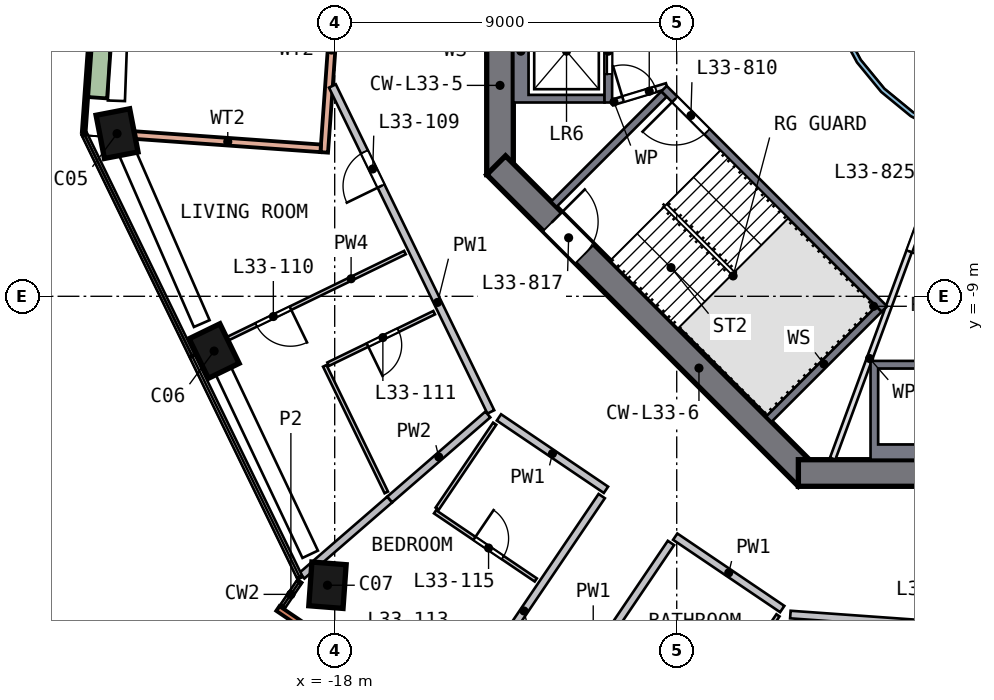
"""IFC4 building model, lengths in metres.
Left out: names, types, materials, properties, quantities, classifications, styles, units other than length and angle.
Written with IfcOpenShell. Run it as: python <this file> out.ifc"""

import sys

from ifc_helpers import new_model, si_unit, direction, frame, frame_2d, origin, origin_2d, place, context, subcontext, project, spatial, polyline, rectangle, outline, extrude, element, fill, save


model = new_model("IFC4")
c1 = context("Model", 3, precision=1e-05, world=origin(), true_north=direction((0.0, 1.0)))
c2 = subcontext(c1, "Body", "Model", "MODEL_VIEW")
j1 = project(units=[si_unit("LENGTHUNIT", "METRE"), si_unit("PLANEANGLEUNIT", "RADIAN")], contexts=[c1])
p1 = place(None, origin())
s1 = spatial("IfcSite", under=j1, at=p1, CompositionType="ELEMENT")
p2 = place(p1, origin())
s2 = spatial("IfcBuilding", under=s1, at=p2, CompositionType="ELEMENT")
p3 = place(p2, frame((0.0, 0.0, 140.0)))
s3 = spatial("IfcBuildingStorey", under=s2, at=p3, CompositionType="ELEMENT", Elevation=140.0)
p4 = place(p3, frame((-23.755, -4.583, 0.0), z_axis=(0.02273176, -0.112822514, 0.993355096), x_axis=(-0.187926686, 0.97541727, 0.115085666)))
e1 = element("IfcColumn", 1, at=p4, inside=s3, PredefinedType="COLUMN", context=c2, shape_type="SweptSolid", body=[
    extrude(rectangle(XDim=1.15, YDim=0.9, at=origin_2d()), origin(), (0.0, 0.0, 1.0), 3.211),
])
p5 = place(p3, frame((-21.233, -10.32, 0.0), z_axis=(0.04988903, -0.100614614, 0.993673882), x_axis=(0.433851601, -0.893958315, -0.11230013)))
e2 = element("IfcColumn", 2, at=p5, inside=s3, PredefinedType="COLUMN", context=c2, shape_type="SweptSolid", body=[
    extrude(rectangle(XDim=1.15, YDim=0.9, at=origin_2d()), origin(), (0.0, 0.0, 1.0), 3.21),
])
p6 = place(p3, frame((-18.286, -16.499, 0.0), z_axis=(0.0792002, -0.086268932, 0.993118825), x_axis=(0.077523727, 0.993764179, 0.080142555)))
e3 = element("IfcColumn", 3, at=p6, inside=s3, PredefinedType="COLUMN", context=c2, shape_type="SweptSolid", body=[
    extrude(rectangle(XDim=1.15, YDim=0.9, at=origin_2d()), origin(), (0.0, 0.0, 1.0), 3.212),
])
p7 = place(p3, frame((-13.65, 5.799, 0.0), z_axis=(0.0, 0.0, 1.0), x_axis=(0.0, -1.0, 0.0)))
e4 = element("IfcWall", 4, at=p7, inside=s3, PredefinedType="SHEAR", context=c2, shape_type="SweptSolid", body=[
    extrude(rectangle(XDim=11.598, YDim=0.7, at=frame_2d((5.799, 0.0))), origin(), (0.0, 0.0, 1.0), 3.5),
])
p8 = place(p7, frame((4.899, 0.0, 0.0)))
e5 = element("IfcOpeningElement", 5, at=p8, cuts=e4, PredefinedType="OPENING", context=c2, shape_type="SweptSolid", body=[
    extrude(rectangle(XDim=1.8, YDim=2.1, at=frame_2d((0.9, 1.05))), frame((0.0, 0.36, 0.0), z_axis=(0.0, -1.0, 0.0), x_axis=(1.0, 0.0, 0.0)), (0.0, 0.0, 1.0), 0.72),
])
p9 = place(p3, frame((-13.752, -5.552, 0.0), z_axis=(0.0, 0.0, 1.0), x_axis=(0.707106781, -0.707106781, 0.0)))
e6 = element("IfcWall", 6, at=p9, inside=s3, PredefinedType="SHEAR", context=c2, shape_type="SweptSolid", body=[
    extrude(rectangle(XDim=11.598, YDim=0.7, at=frame_2d((5.799, 0.0))), origin(), (0.0, 0.0, 1.0), 3.5),
])
p10 = place(p9, frame((2.099, 0.0, 0.0)))
e7 = element("IfcOpeningElement", 7, at=p10, cuts=e6, PredefinedType="OPENING", context=c2, shape_type="SweptSolid", body=[
    extrude(rectangle(XDim=1.2, YDim=2.1, at=frame_2d((0.6, 1.05))), frame((0.0, 0.36, 0.0), z_axis=(0.0, -1.0, 0.0), x_axis=(1.0, 0.0, 0.0)), (0.0, 0.0, 1.0), 0.72),
])
p11 = place(p3, frame((-5.799, -13.65, 0.0), z_axis=(0.0, 0.0, 1.0), x_axis=(1.0, 0.0, 0.0)))
e8 = element("IfcWall", 8, at=p11, inside=s3, PredefinedType="SHEAR", context=c2, shape_type="SweptSolid", body=[
    extrude(rectangle(XDim=11.598, YDim=0.7, at=frame_2d((5.799, 0.0))), origin(), (0.0, 0.0, 1.0), 3.5),
])
p12 = place(p11, frame((4.899, 0.0, 0.0)))
e9 = element("IfcOpeningElement", 9, at=p12, cuts=e8, PredefinedType="OPENING", context=c2, shape_type="SweptSolid", body=[
    extrude(rectangle(XDim=1.8, YDim=2.1, at=frame_2d((0.9, 1.05))), frame((0.0, 0.36, 0.0), z_axis=(0.0, -1.0, 0.0), x_axis=(1.0, 0.0, 0.0)), (0.0, 0.0, 1.0), 0.72),
])
p13 = place(p3, frame((-19.495, -17.216, 0.0), z_axis=(0.0, 0.0, 1.0), x_axis=(0.828285191, -0.56030674, 0.0)))
e10 = element("IfcWall", 10, at=p13, inside=s3, PredefinedType="SOLIDWALL", context=c2, shape_type="SweptSolid", body=[
    extrude(rectangle(XDim=1.875, YDim=0.15, at=frame_2d((0.938, 0.0))), origin(), (0.0, 0.0, 1.0), 3.19),
])
p14 = place(p3, frame((-18.276, -5.213, 0.0), z_axis=(0.0, 0.0, 1.0), x_axis=(0.07115763, 0.997465083, 0.0)))
e11 = element("IfcWall", 11, at=p14, inside=s3, PredefinedType="SOLIDWALL", context=c2, shape_type="SweptSolid", body=[
    extrude(rectangle(XDim=13.0, YDim=0.2, at=frame_2d((6.5, 0.0))), origin(), (0.0, 0.0, 1.0), 3.19),
])
p15 = place(p14, frame((5.6, 0.0, 0.0)))
e12 = element("IfcOpeningElement", 12, at=p15, cuts=e11, PredefinedType="OPENING", context=c2, shape_type="SweptSolid", body=[
    extrude(rectangle(XDim=1.8, YDim=2.4, at=frame_2d((0.9, 1.2))), frame((0.0, 0.11, 0.0), z_axis=(0.0, -1.0, 0.0), x_axis=(1.0, 0.0, 0.0)), (0.0, 0.0, 1.0), 0.22),
])
p16 = place(p3, frame((-23.26, -4.757, 0.0), z_axis=(0.0, 0.0, 1.0), x_axis=(0.997466023, -0.071144445, 0.0)))
e13 = element("IfcWall", 13, at=p16, inside=s3, PredefinedType="SOLIDWALL", context=c2, shape_type="SweptSolid", body=[
    extrude(rectangle(XDim=4.904, YDim=0.2, at=frame_2d((2.452, 0.0))), origin(), (0.0, 0.0, 1.0), 3.19),
])
p17 = place(p3, frame((-23.69, 8.126, 0.0), z_axis=(0.0, 0.0, 1.0), x_axis=(-0.071149761, -0.997465644, 0.0)))
e14 = element("IfcWall", 14, at=p17, inside=s3, PredefinedType="SOLIDWALL", context=c2, shape_type="SweptSolid", body=[
    extrude(rectangle(XDim=12.84, YDim=0.1, at=frame_2d((6.42, 0.0))), origin(), (0.0, 0.0, 1.0), 0.7),
])
p18 = place(p3, frame((-23.921, 0.668, 0.0), z_axis=(0.0, 0.0, 1.0), x_axis=(-0.071145773, -0.997465929, 0.0)))
e15 = element("IfcWall", 15, at=p18, inside=s3, PredefinedType="SOLIDWALL", context=c2, shape_type="SweptSolid", body=[
    extrude(rectangle(XDim=4.454, YDim=0.5, at=frame_2d((2.227, 0.0))), origin(), (0.0, 0.0, 1.0), 0.7),
])
p19 = place(p3, origin())
e16 = element("IfcWall", 16, at=p19, inside=s3, PredefinedType="SOLIDWALL", context=c2, shape_type="SweptSolid", body=[
    extrude(outline(polyline([(-13.3, -3.9), (-13.3, -1.2), (-10.9, -1.2), (-10.9, -1.4), (-12.9, -1.4), (-12.9, -3.7), (-10.9, -3.7), (-10.9, -3.9), (-13.3, -3.9)])), origin(), (0.0, 0.0, 1.0), 3.19),
])
p20 = place(p3, frame((-10.8, -1.2, 0.0), z_axis=(0.0, 0.0, 1.0), x_axis=(0.0, -1.0, 0.0)))
e17 = element("IfcWall", 17, at=p20, inside=s3, PredefinedType="SOLIDWALL", context=c2, shape_type="SweptSolid", body=[
    extrude(rectangle(XDim=2.7, YDim=0.2, at=frame_2d((1.35, 0.0))), origin(), (0.0, 0.0, 1.0), 3.19),
])
p21 = place(p20, frame((0.75, 0.0, 0.0)))
e18 = element("IfcOpeningElement", 18, at=p21, cuts=e17, PredefinedType="OPENING", context=c2, shape_type="SweptSolid", body=[
    extrude(rectangle(XDim=1.2, YDim=2.1, at=frame_2d((0.6, 1.05))), frame((0.0, 0.11, 0.0), z_axis=(0.0, -1.0, 0.0), x_axis=(1.0, 0.0, 0.0)), (0.0, 0.0, 1.0), 0.22),
])
p22 = place(p3, origin())
e19 = element("IfcWall", 19, at=p22, inside=s3, PredefinedType="SOLIDWALL", context=c2, shape_type="SweptSolid", body=[
    extrude(outline(polyline([(-1.2, -13.3), (-3.9, -13.3), (-3.9, -10.7), (-1.2, -10.7), (-1.2, -13.3)]), holes=[polyline([(-3.7, -10.9), (-3.7, -12.9), (-1.4, -12.9), (-1.4, -10.9), (-3.7, -10.9)])]), origin(), (0.0, 0.0, 1.0), 3.19),
])
p23 = place(p3, frame((-3.535, -9.334, 0.0), z_axis=(0.0, 0.0, 1.0), x_axis=(-0.707106781, 0.707106781, 0.0)))
e20 = element("IfcWall", 20, at=p23, inside=s3, PredefinedType="SOLIDWALL", context=c2, shape_type="SweptSolid", body=[
    extrude(rectangle(XDim=8.2, YDim=0.2, at=frame_2d((4.1, 0.0))), origin(), (0.0, 0.0, 1.0), 3.19),
])
p24 = place(p23, frame((6.6, 0.0, 0.0)))
e21 = element("IfcOpeningElement", 21, at=p24, cuts=e20, PredefinedType="OPENING", context=c2, shape_type="SweptSolid", body=[
    extrude(rectangle(XDim=1.2, YDim=2.1, at=frame_2d((0.6, 1.05))), frame((0.0, 0.11, 0.0), z_axis=(0.0, -1.0, 0.0), x_axis=(1.0, 0.0, 0.0)), (0.0, 0.0, 1.0), 0.22),
])
for number, where, z_axis, x_axis in (
    (22, (-9.334, -3.677, 0.0), (0.0, 0.0, 1.0), (-0.707, -0.707, 0.0)),
    (23, (-3.677, -9.334, 0.0), (0.0, 0.0, 1.0), (-0.707, -0.707, 0.0)),
):
    element("IfcWall", number, at=place(p3, frame(where, z_axis=z_axis, x_axis=x_axis)), inside=s3, PredefinedType="SOLIDWALL", context=c2, shape_type="SweptSolid", body=[
        extrude(rectangle(XDim=4.1, YDim=0.2, at=frame_2d((2.05, 0.0))), origin(), (0.0, 0.0, 1.0), 3.19),
    ])
p25 = place(p3, frame((-10.7, -3.9, 0.0), z_axis=(0.0, 0.0, 1.0), x_axis=(0.957084567, 0.289808785, 0.0)))
e24 = element("IfcWall", 24, at=p25, inside=s3, PredefinedType="PARTITIONING", context=c2, shape_type="SweptSolid", body=[
    extrude(rectangle(XDim=1.501, YDim=0.15, at=frame_2d((0.75, 0.0))), origin(), (0.0, 0.0, 1.0), 3.19),
])
p26 = place(p25, frame((0.301, 0.0, 0.0)))
e25 = element("IfcOpeningElement", 25, at=p26, cuts=e24, PredefinedType="OPENING", context=c2, shape_type="SweptSolid", body=[
    extrude(rectangle(XDim=0.9, YDim=2.1, at=frame_2d((0.45, 1.05))), frame((0.0, 0.085, 0.0), z_axis=(0.0, -1.0, 0.0), x_axis=(1.0, 0.0, 0.0)), (0.0, 0.0, 1.0), 0.17),
])
p27 = place(p3, frame((-1.776, -4.813, 0.0), z_axis=(0.0, 0.0, 1.0), x_axis=(-0.346109381, -0.938194168, 0.0)))
e26 = element("IfcWall", 26, at=p27, inside=s3, PredefinedType="PARTITIONING", context=c2, shape_type="SweptSolid", body=[
    extrude(rectangle(XDim=9.016, YDim=0.15, at=frame_2d((4.508, 0.0))), origin(), (0.0, 0.0, 1.0), 3.19),
])
p28 = place(p27, frame((1.4, 0.0, 0.0)))
e27 = element("IfcOpeningElement", 27, at=p28, cuts=e26, PredefinedType="OPENING", context=c2, shape_type="SweptSolid", body=[
    extrude(rectangle(XDim=1.8, YDim=2.1, at=frame_2d((0.9, 1.05))), frame((0.0, 0.085, 0.0), z_axis=(0.0, -1.0, 0.0), x_axis=(1.0, 0.0, 0.0)), (0.0, 0.0, 1.0), 0.17),
])
p29 = place(p3, origin())
e28 = element("IfcWall", 28, at=p29, inside=s3, PredefinedType="SOLIDWALL", context=c2, shape_type="SweptSolid", body=[
    extrude(outline(polyline([(5.021, -0.999), (4.73, -1.959), (4.257, -2.844), (3.62, -3.62), (2.844, -4.257), (1.959, -4.73), (0.999, -5.021), (0.0, -5.12), (-0.999, -5.021), (-1.959, -4.73), (-2.844, -4.257), (-3.62, -3.62), (-4.257, -2.844), (-4.73, -1.959), (-5.021, -0.999), (-5.12, 0.0), (-5.021, 0.999), (-4.73, 1.959), (-4.257, 2.844), (-3.62, 3.62), (-2.844, 4.257), (-1.959, 4.73), (-0.999, 5.021), (0.0, 5.12), (0.999, 5.021), (1.959, 4.73), (2.844, 4.257), (3.62, 3.62), (4.257, 2.844), (4.73, 1.959), (5.021, 0.999), (5.12, 0.0), (5.021, -0.999)]), holes=[polyline([(4.904, 0.976), (4.619, 1.913), (4.157, 2.778), (3.535, 3.535), (2.778, 4.157), (1.913, 4.619), (0.976, 4.904), (0.0, 5.0), (-0.976, 4.904), (-1.913, 4.619), (-2.778, 4.157), (-3.535, 3.535), (-4.157, 2.778), (-4.619, 1.913), (-4.904, 0.976), (-5.0, 0.0), (-4.904, -0.976), (-4.619, -1.913), (-4.157, -2.778), (-3.535, -3.535), (-2.778, -4.157), (-1.913, -4.619), (-0.976, -4.904), (0.0, -5.0), (0.976, -4.904), (1.913, -4.619), (2.778, -4.157), (3.535, -3.535), (4.157, -2.778), (4.619, -1.913), (4.904, -0.976), (5.0, 0.0), (4.904, 0.976)])]), origin(), (0.0, 0.0, 1.0), 3.19),
])
p30 = place(p3, frame((-13.892, -12.042, 0.0), z_axis=(0.0, 0.0, 1.0), x_axis=(-0.437108724, 0.899408674, 0.0)))
e29 = element("IfcWall", 29, at=p30, inside=s3, PredefinedType="SOLIDWALL", context=c2, shape_type="SweptSolid", body=[
    extrude(rectangle(XDim=9.536, YDim=0.2, at=frame_2d((4.768, 0.0))), origin(), (0.0, 0.0, 1.0), 3.19),
])
p31 = place(p30, frame((6.608, 0.0, 0.0)))
e30 = element("IfcOpeningElement", 30, at=p31, cuts=e29, PredefinedType="OPENING", context=c2, shape_type="SweptSolid", body=[
    extrude(rectangle(XDim=1.0, YDim=2.1, at=frame_2d((0.5, 1.05))), frame((0.0, 0.11, 0.0), z_axis=(0.0, -1.0, 0.0), x_axis=(1.0, 0.0, 0.0)), (0.0, 0.0, 1.0), 0.22),
])
p32 = place(p3, frame((-10.974, -14.258, 0.0), z_axis=(0.0, 0.0, 1.0), x_axis=(-0.56035998, -0.828249173, 0.0)))
e31 = element("IfcWall", 31, at=p32, inside=s3, PredefinedType="SOLIDWALL", context=c2, shape_type="SweptSolid", body=[
    extrude(rectangle(XDim=7.3, YDim=0.2, at=frame_2d((3.65, 0.0))), origin(), (0.0, 0.0, 1.0), 3.19),
])
p33 = place(p3, frame((-13.678, -12.187, 0.0), z_axis=(0.0, 0.0, 1.0), x_axis=(0.828263809, -0.560338347, 0.0)))
e32 = element("IfcWall", 32, at=p33, inside=s3, PredefinedType="SOLIDWALL", context=c2, shape_type="SweptSolid", body=[
    extrude(rectangle(XDim=3.4, YDim=0.2, at=frame_2d((1.7, 0.0))), origin(), (0.0, 0.0, 1.0), 3.19),
])
p34 = place(p3, frame((-13.242, -21.537, 0.0), z_axis=(0.0, 0.0, 1.0), x_axis=(0.56035998, 0.828249173, 0.0)))
e33 = element("IfcWall", 33, at=p34, inside=s3, PredefinedType="SOLIDWALL", context=c2, shape_type="SweptSolid", body=[
    extrude(rectangle(XDim=7.3, YDim=0.2, at=frame_2d((3.65, 0.0))), origin(), (0.0, 0.0, 1.0), 3.19),
])
p35 = place(p3, frame((-9.04, -15.325, 0.0), z_axis=(0.0, 0.0, 1.0), x_axis=(0.828253029, -0.560354281, 0.0)))
e34 = element("IfcWall", 34, at=p35, inside=s3, PredefinedType="SOLIDWALL", context=c2, shape_type="SweptSolid", body=[
    extrude(rectangle(XDim=3.4, YDim=0.2, at=frame_2d((1.7, 0.0))), origin(), (0.0, 0.0, 1.0), 3.19),
])
p36 = place(p3, frame((3.482, -18.052, 0.0), z_axis=(0.0, 0.0, 1.0), x_axis=(-0.997466118, 0.071143125, 0.0)))
e35 = element("IfcWall", 35, at=p36, inside=s3, PredefinedType="SOLIDWALL", context=c2, shape_type="SweptSolid", body=[
    extrude(rectangle(XDim=9.516, YDim=0.2, at=frame_2d((4.758, 0.0))), origin(), (0.0, 0.0, 1.0), 3.19),
])
p37 = place(p36, frame((5.15, 0.0, 0.0)))
e36 = element("IfcOpeningElement", 36, at=p37, cuts=e35, PredefinedType="OPENING", context=c2, shape_type="SweptSolid", body=[
    extrude(rectangle(XDim=1.0, YDim=2.1, at=frame_2d((0.5, 1.05))), frame((0.0, 0.11, 0.0), z_axis=(0.0, -1.0, 0.0), x_axis=(1.0, 0.0, 0.0)), (0.0, 0.0, 1.0), 0.22),
])
p38 = place(p3, frame((-16.552, -14.348, 0.0), z_axis=(0.0, 0.0, 1.0), x_axis=(-0.75562852, -0.655000411, 0.0)))
e37 = element("IfcWall", 37, at=p38, inside=s3, PredefinedType="SOLIDWALL", context=c2, shape_type="SweptSolid", body=[
    extrude(rectangle(XDim=3.059, YDim=0.2, at=frame_2d((1.53, 0.0))), origin(), (0.0, 0.0, 1.0), 3.19),
])
p39 = place(p3, frame((-13.97, -12.11, 0.0), z_axis=(0.0, 0.0, 1.0), x_axis=(-0.75562306, -0.655006711, 0.0)))
e38 = element("IfcWall", 38, at=p39, inside=s3, PredefinedType="SOLIDWALL", context=c2, shape_type="SweptSolid", body=[
    extrude(rectangle(XDim=3.417, YDim=0.2, at=frame_2d((1.708, 0.0))), origin(), (0.0, 0.0, 1.0), 3.19),
])
p40 = place(p3, frame((-16.152, -7.85, 0.0), z_axis=(0.0, 0.0, 1.0), x_axis=(-0.899404273, -0.437117781, 0.0)))
e39 = element("IfcWall", 39, at=p40, inside=s3, PredefinedType="PARTITIONING", context=c2, shape_type="SweptSolid", body=[
    extrude(rectangle(XDim=6.15, YDim=0.1, at=frame_2d((3.075, 0.0))), origin(), (0.0, 0.0, 1.0), 3.19),
])
p41 = place(p40, frame((3.35, 0.0, 0.0)))
e40 = element("IfcOpeningElement", 40, at=p41, cuts=e39, PredefinedType="OPENING", context=c2, shape_type="SweptSolid", body=[
    extrude(rectangle(XDim=1.0, YDim=2.1, at=frame_2d((0.5, 1.05))), frame((0.0, 0.06, 0.0), z_axis=(0.0, -1.0, 0.0), x_axis=(1.0, 0.0, 0.0)), (0.0, 0.0, 1.0), 0.12),
])
p42 = place(p3, frame((-18.261, -10.83, 0.0), z_axis=(0.0, 0.0, 1.0), x_axis=(0.437060899, -0.899431915, 0.0)))
e41 = element("IfcWall", 41, at=p42, inside=s3, PredefinedType="PARTITIONING", context=c2, shape_type="SweptSolid", body=[
    extrude(rectangle(XDim=3.704, YDim=0.1, at=frame_2d((1.852, 0.0))), origin(), (0.0, 0.0, 1.0), 3.19),
])
p43 = place(p3, frame((-15.383, -9.431, 0.0), z_axis=(0.0, 0.0, 1.0), x_axis=(-0.89941086, -0.437104227, 0.0)))
e42 = element("IfcWall", 42, at=p43, inside=s3, PredefinedType="PARTITIONING", context=c2, shape_type="SweptSolid", body=[
    extrude(rectangle(XDim=3.1, YDim=0.1, at=frame_2d((1.55, 0.0))), origin(), (0.0, 0.0, 1.0), 3.19),
])
p44 = place(p43, frame((1.05, 0.0, 0.0)))
e43 = element("IfcOpeningElement", 43, at=p44, cuts=e42, PredefinedType="OPENING", context=c2, shape_type="SweptSolid", body=[
    extrude(rectangle(XDim=0.9, YDim=2.1, at=frame_2d((0.45, 1.05))), frame((0.0, 0.06, 0.0), z_axis=(0.0, -1.0, 0.0), x_axis=(1.0, 0.0, 0.0)), (0.0, 0.0, 1.0), 0.12),
])
p45 = place(p3, frame((-13.79, -12.353, 0.0), z_axis=(0.0, 0.0, 1.0), x_axis=(-0.560342209, -0.828261196, 0.0)))
e44 = element("IfcWall", 44, at=p45, inside=s3, PredefinedType="PARTITIONING", context=c2, shape_type="SweptSolid", body=[
    extrude(rectangle(XDim=2.7, YDim=0.1, at=frame_2d((1.35, 0.0))), origin(), (0.0, 0.0, 1.0), 3.19),
])
p46 = place(p3, frame((-15.359, -14.672, 0.0), z_axis=(0.0, 0.0, 1.0), x_axis=(0.828239672, -0.560374023, 0.0)))
e45 = element("IfcWall", 45, at=p46, inside=s3, PredefinedType="PARTITIONING", context=c2, shape_type="SweptSolid", body=[
    extrude(rectangle(XDim=3.2, YDim=0.1, at=frame_2d((1.6, 0.0))), origin(), (0.0, 0.0, 1.0), 3.19),
])
p47 = place(p46, frame((1.25, 0.0, 0.0)))
e46 = element("IfcOpeningElement", 46, at=p47, cuts=e45, PredefinedType="OPENING", context=c2, shape_type="SweptSolid", body=[
    extrude(rectangle(XDim=0.9, YDim=2.1, at=frame_2d((0.45, 1.05))), frame((0.0, 0.06, 0.0), z_axis=(0.0, -1.0, 0.0), x_axis=(1.0, 0.0, 0.0)), (0.0, 0.0, 1.0), 0.12),
])
p48 = place(p3, frame((-7.849, -19.632, 0.0), z_axis=(0.0, 0.0, 1.0), x_axis=(0.560342209, 0.828261196, 0.0)))
e47 = element("IfcWall", 47, at=p48, inside=s3, PredefinedType="PARTITIONING", context=c2, shape_type="SweptSolid", body=[
    extrude(rectangle(XDim=2.7, YDim=0.1, at=frame_2d((1.35, 0.0))), origin(), (0.0, 0.0, 1.0), 3.19),
])
p49 = place(p21, origin())
e48 = element("IfcDoor", 48, at=p49, inside=s3, OperationType="DOUBLE_DOOR_SLIDING", PredefinedType="DOOR", context=c2, shape_type="SweptSolid", body=[
    extrude(rectangle(XDim=1.2, YDim=2.1, at=frame_2d((0.6, 1.05))), frame((0.0, 0.025, 0.0), z_axis=(0.0, -1.0, 0.0), x_axis=(1.0, 0.0, 0.0)), (0.0, 0.0, 1.0), 0.05),
])
fill(e18, e48)
p50 = place(p24, origin())
e49 = element("IfcDoor", 49, at=p50, inside=s3, OperationType="SINGLE_SWING_RIGHT", PredefinedType="DOOR", context=c2, shape_type="SweptSolid", body=[
    extrude(rectangle(XDim=1.2, YDim=2.1, at=frame_2d((0.6, 1.05))), frame((0.0, 0.025, 0.0), z_axis=(0.0, -1.0, 0.0), x_axis=(1.0, 0.0, 0.0)), (0.0, 0.0, 1.0), 0.05),
])
fill(e21, e49)
p51 = place(p10, origin())
e50 = element("IfcDoor", 50, at=p51, inside=s3, OperationType="SINGLE_SWING_LEFT", PredefinedType="DOOR", context=c2, shape_type="SweptSolid", body=[
    extrude(rectangle(XDim=1.2, YDim=2.1, at=frame_2d((0.6, 1.05))), frame((0.0, 0.025, 0.0), z_axis=(0.0, -1.0, 0.0), x_axis=(1.0, 0.0, 0.0)), (0.0, 0.0, 1.0), 0.05),
])
fill(e7, e50)
p52 = place(p26, origin())
e51 = element("IfcDoor", 51, at=p52, inside=s3, OperationType="SINGLE_SWING_LEFT", PredefinedType="DOOR", context=c2, shape_type="SweptSolid", body=[
    extrude(rectangle(XDim=0.9, YDim=2.1, at=frame_2d((0.45, 1.05))), frame((0.0, 0.025, 0.0), z_axis=(0.0, -1.0, 0.0), x_axis=(1.0, 0.0, 0.0)), (0.0, 0.0, 1.0), 0.05),
])
fill(e25, e51)
p53 = place(p28, origin())
e52 = element("IfcDoor", 52, at=p53, inside=s3, OperationType="DOUBLE_DOOR_SINGLE_SWING", PredefinedType="DOOR", context=c2, shape_type="SweptSolid", body=[
    extrude(rectangle(XDim=1.8, YDim=2.1, at=frame_2d((0.9, 1.05))), frame((0.0, 0.025, 0.0), z_axis=(0.0, -1.0, 0.0), x_axis=(1.0, 0.0, 0.0)), (0.0, 0.0, 1.0), 0.05),
])
fill(e27, e52)
p54 = place(p31, origin())
e53 = element("IfcDoor", 53, at=p54, inside=s3, OperationType="SINGLE_SWING_LEFT", PredefinedType="DOOR", context=c2, shape_type="SweptSolid", body=[
    extrude(rectangle(XDim=1.0, YDim=2.1, at=frame_2d((0.5, 1.05))), frame((0.0, 0.025, 0.0), z_axis=(0.0, -1.0, 0.0), x_axis=(1.0, 0.0, 0.0)), (0.0, 0.0, 1.0), 0.05),
])
fill(e30, e53)
p55 = place(p41, origin())
e54 = element("IfcDoor", 54, at=p55, inside=s3, OperationType="SINGLE_SWING_LEFT", PredefinedType="DOOR", context=c2, shape_type="SweptSolid", body=[
    extrude(rectangle(XDim=1.0, YDim=2.1, at=frame_2d((0.5, 1.05))), frame((0.0, 0.025, 0.0), z_axis=(0.0, -1.0, 0.0), x_axis=(1.0, 0.0, 0.0)), (0.0, 0.0, 1.0), 0.05),
])
fill(e40, e54)
p56 = place(p44, origin())
e55 = element("IfcDoor", 55, at=p56, inside=s3, OperationType="SINGLE_SWING_RIGHT", PredefinedType="DOOR", context=c2, shape_type="SweptSolid", body=[
    extrude(rectangle(XDim=0.9, YDim=2.1, at=frame_2d((0.45, 1.05))), frame((0.0, 0.025, 0.0), z_axis=(0.0, -1.0, 0.0), x_axis=(1.0, 0.0, 0.0)), (0.0, 0.0, 1.0), 0.05),
])
fill(e43, e55)
p57 = place(p47, origin())
e56 = element("IfcDoor", 56, at=p57, inside=s3, OperationType="SINGLE_SWING_LEFT", PredefinedType="DOOR", context=c2, shape_type="SweptSolid", body=[
    extrude(rectangle(XDim=0.9, YDim=2.1, at=frame_2d((0.45, 1.05))), frame((0.0, 0.025, 0.0), z_axis=(0.0, -1.0, 0.0), x_axis=(1.0, 0.0, 0.0)), (0.0, 0.0, 1.0), 0.05),
])
fill(e46, e56)
save(model, sys.argv[1])
